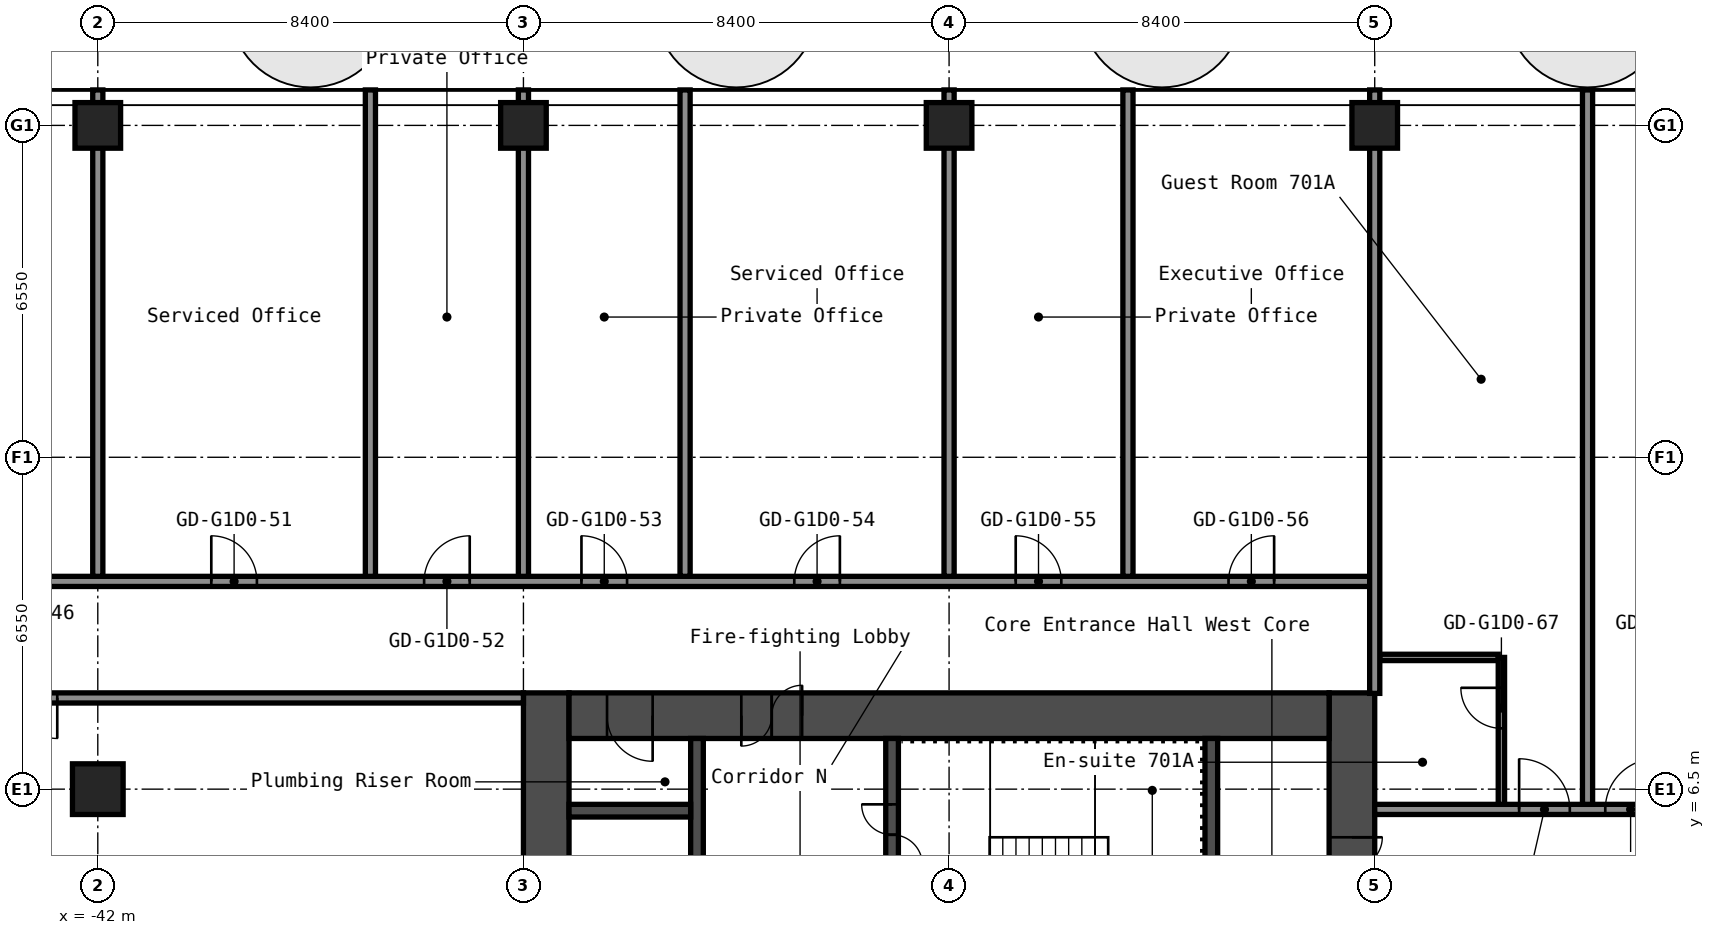
"""IFC4 building model, lengths in metres.
Left out: names, types, materials, properties, quantities, classifications, styles, units other than length and angle.
Written with IfcOpenShell. Run it as: python <this file> out.ifc"""

import sys

from ifc_helpers import new_model, si_unit, direction, frame, frame_2d, origin, origin_2d, place, context, subcontext, project, spatial, rectangle, hollow_rectangle, extrude, element, fill, save


model = new_model("IFC4")
c1 = context("Model", 3, precision=1e-05, world=origin(), true_north=direction((0.0, 1.0)))
c2 = subcontext(c1, "Body", "Model", "MODEL_VIEW")
j1 = project(units=[si_unit("LENGTHUNIT", "METRE"), si_unit("PLANEANGLEUNIT", "RADIAN")], contexts=[c1])
p1 = place(None, origin())
s1 = spatial("IfcSite", under=j1, at=p1, CompositionType="ELEMENT")
p2 = place(p1, origin())
s2 = spatial("IfcBuilding", under=s1, at=p2, CompositionType="ELEMENT")
p3 = place(p2, frame((0.0, 0.0, 29.4)))
s3 = spatial("IfcBuildingStorey", under=s2, at=p3, CompositionType="ELEMENT", Elevation=29.4)
p4 = place(p3, frame((-42.0, 6.5, 0.0), z_axis=(0.0, 0.0, 1.0), x_axis=(1.0, 0.0, 0.0)))
e1 = element("IfcColumn", 1, at=p4, inside=s3, PredefinedType="COLUMN", context=c2, shape_type="SweptSolid", body=[
    extrude(hollow_rectangle(XDim=1.0, YDim=1.0, WallThickness=0.04, at=origin_2d()), origin(), (0.0, 0.0, 1.0), 2.8),
])
for number, where, z_axis, x_axis in (
    (2, (-42.0, 19.6, 0.0), (0.0, 0.0, 1.0), (1.0, 0.0, 0.0)),
    (3, (-33.6, 19.6, 0.0), (0.0, 0.0, 1.0), (1.0, 0.0, 0.0)),
    (4, (-25.2, 19.6, 0.0), (0.0, 0.0, 1.0), (1.0, 0.0, 0.0)),
    (5, (-16.8, 19.6, 0.0), (0.0, 0.0, 1.0), (1.0, 0.0, 0.0)),
):
    element("IfcColumn", number, at=place(p3, frame(where, z_axis=z_axis, x_axis=x_axis)), inside=s3, PredefinedType="COLUMN", context=c2, shape_type="SweptSolid", body=[
        extrude(hollow_rectangle(XDim=0.9, YDim=0.9, WallThickness=0.036, at=origin_2d()), origin(), (0.0, 0.0, 1.0), 2.8),
    ])
p5 = place(p3, frame((-17.25, -8.4, 0.0), z_axis=(0.0, 0.0, 1.0), x_axis=(0.0, 1.0, 0.0)))
e6 = element("IfcWall", 6, at=p5, inside=s3, PredefinedType="SHEAR", context=c2, shape_type="SweptSolid", body=[
    extrude(rectangle(XDim=16.8, YDim=0.9, at=frame_2d((8.4, 0.0))), origin(), (0.0, 0.0, 1.0), 2.8),
])
p6 = place(p5, frame((12.75, 0.0, 0.0)))
e7 = element("IfcOpeningElement", 7, at=p6, cuts=e6, PredefinedType="OPENING", context=c2, shape_type="SweptSolid", body=[
    extrude(rectangle(XDim=1.2, YDim=2.1, at=frame_2d((0.6, 1.05))), frame((0.0, 0.46, 0.0), z_axis=(0.0, -1.0, 0.0), x_axis=(1.0, 0.0, 0.0)), (0.0, 0.0, 1.0), 0.92),
])
p7 = place(p5, frame((2.85, 0.0, 0.0)))
e8 = element("IfcOpeningElement", 8, at=p7, cuts=e6, PredefinedType="OPENING", context=c2, shape_type="SweptSolid", body=[
    extrude(rectangle(XDim=1.2, YDim=2.1, at=frame_2d((0.6, 1.05))), frame((0.0, 0.46, 0.0), z_axis=(0.0, -1.0, 0.0), x_axis=(1.0, 0.0, 0.0)), (0.0, 0.0, 1.0), 0.92),
])
p8 = place(p3, frame((-33.15, -8.4, 0.0), z_axis=(0.0, 0.0, 1.0), x_axis=(0.0, 1.0, 0.0)))
e9 = element("IfcWall", 9, at=p8, inside=s3, PredefinedType="SHEAR", context=c2, shape_type="SweptSolid", body=[
    extrude(rectangle(XDim=16.8, YDim=0.9, at=frame_2d((8.4, 0.0))), origin(), (0.0, 0.0, 1.0), 2.8),
])
p9 = place(p3, frame((-32.7, 7.95, 0.0), z_axis=(0.0, 0.0, 1.0), x_axis=(1.0, 0.0, 0.0)))
e10 = element("IfcWall", 10, at=p9, inside=s3, PredefinedType="SHEAR", context=c2, shape_type="SweptSolid", body=[
    extrude(rectangle(XDim=15.0, YDim=0.9, at=frame_2d((7.5, 0.0))), origin(), (0.0, 0.0, 1.0), 2.8),
])
p10 = place(p9, frame((3.4, 0.0, 0.0)))
e11 = element("IfcOpeningElement", 11, at=p10, cuts=e10, PredefinedType="OPENING", context=c2, shape_type="SweptSolid", body=[
    extrude(rectangle(XDim=1.2, YDim=2.1, at=frame_2d((0.6, 1.05))), frame((0.0, 0.46, 0.0), z_axis=(0.0, -1.0, 0.0), x_axis=(1.0, 0.0, 0.0)), (0.0, 0.0, 1.0), 0.92),
])
p11 = place(p9, frame((0.75, 0.0, 0.0)))
e12 = element("IfcOpeningElement", 12, at=p11, cuts=e10, PredefinedType="OPENING", context=c2, shape_type="SweptSolid", body=[
    extrude(rectangle(XDim=0.9, YDim=2.1, at=frame_2d((0.45, 1.05))), frame((0.0, 0.46, 0.0), z_axis=(0.0, -1.0, 0.0), x_axis=(1.0, 0.0, 0.0)), (0.0, 0.0, 1.0), 0.92),
])
p12 = place(p3, frame((-20.025, 1.2, 0.0), z_axis=(0.0, 0.0, 1.0), x_axis=(0.0, 1.0, 0.0)))
e13 = element("IfcWall", 13, at=p12, inside=s3, PredefinedType="SHEAR", context=c2, shape_type="SweptSolid", body=[
    extrude(rectangle(XDim=6.3, YDim=0.25, at=frame_2d((3.15, 0.0))), origin(), (0.0, 0.0, 1.0), 2.8),
])
p13 = place(p3, frame((-26.325, 3.75, 0.0), z_axis=(0.0, 0.0, 1.0), x_axis=(0.0, 1.0, 0.0)))
e14 = element("IfcWall", 14, at=p13, inside=s3, PredefinedType="SHEAR", context=c2, shape_type="SweptSolid", body=[
    extrude(rectangle(XDim=3.75, YDim=0.25, at=frame_2d((1.875, 0.0))), origin(), (0.0, 0.0, 1.0), 2.8),
])
p14 = place(p13, frame((1.25, 0.0, 0.0)))
e15 = element("IfcOpeningElement", 15, at=p14, cuts=e14, PredefinedType="OPENING", context=c2, shape_type="SweptSolid", body=[
    extrude(rectangle(XDim=1.2, YDim=2.1, at=frame_2d((0.6, 1.05))), frame((0.0, 0.135, 0.0), z_axis=(0.0, -1.0, 0.0), x_axis=(1.0, 0.0, 0.0)), (0.0, 0.0, 1.0), 0.27),
])
p15 = place(p3, frame((-30.175, 1.45, 0.0), z_axis=(0.0, 0.0, 1.0), x_axis=(0.0, 1.0, 0.0)))
e16 = element("IfcWall", 16, at=p15, inside=s3, PredefinedType="SHEAR", context=c2, shape_type="SweptSolid", body=[
    extrude(rectangle(XDim=6.05, YDim=0.25, at=frame_2d((3.025, 0.0))), origin(), (0.0, 0.0, 1.0), 2.8),
])
p16 = place(p15, frame((2.625, 0.0, 0.0)))
e17 = element("IfcOpeningElement", 17, at=p16, cuts=e16, PredefinedType="OPENING", context=c2, shape_type="SweptSolid", body=[
    extrude(rectangle(XDim=1.1, YDim=2.1, at=frame_2d((0.55, 1.05))), frame((0.0, 0.135, 0.0), z_axis=(0.0, -1.0, 0.0), x_axis=(1.0, 0.0, 0.0)), (0.0, 0.0, 1.0), 0.27),
])
p17 = place(p3, frame((-32.7, 6.075, 0.0), z_axis=(0.0, 0.0, 1.0), x_axis=(1.0, 0.0, 0.0)))
e18 = element("IfcWall", 18, at=p17, inside=s3, PredefinedType="SHEAR", context=c2, shape_type="SweptSolid", body=[
    extrude(rectangle(XDim=2.4, YDim=0.25, at=frame_2d((1.2, 0.0))), origin(), (0.0, 0.0, 1.0), 2.8),
])
p18 = place(p3, frame((-16.8, 6.1, 0.0), z_axis=(0.0, 0.0, 1.0), x_axis=(1.0, 0.0, 0.0)))
e19 = element("IfcWall", 19, at=p18, inside=s3, PredefinedType="PARTITIONING", context=c2, shape_type="SweptSolid", body=[
    extrude(rectangle(XDim=33.6, YDim=0.2, at=frame_2d((16.8, 0.0))), origin(), (0.0, 0.0, 1.0), 2.8),
])
p19 = place(p18, frame((2.85, 0.0, 0.0)))
e20 = element("IfcOpeningElement", 20, at=p19, cuts=e19, PredefinedType="OPENING", context=c2, shape_type="SweptSolid", body=[
    extrude(rectangle(XDim=1.0, YDim=2.1, at=frame_2d((0.5, 1.05))), frame((0.0, 0.11, 0.0), z_axis=(0.0, -1.0, 0.0), x_axis=(1.0, 0.0, 0.0)), (0.0, 0.0, 1.0), 0.22),
])
p20 = place(p18, frame((4.55, 0.0, 0.0)))
e21 = element("IfcOpeningElement", 21, at=p20, cuts=e19, PredefinedType="OPENING", context=c2, shape_type="SweptSolid", body=[
    extrude(rectangle(XDim=1.0, YDim=2.1, at=frame_2d((0.5, 1.05))), frame((0.0, 0.11, 0.0), z_axis=(0.0, -1.0, 0.0), x_axis=(1.0, 0.0, 0.0)), (0.0, 0.0, 1.0), 0.22),
])
p21 = place(p18, frame((13.8, 0.0, 0.0)))
e22 = element("IfcOpeningElement", 22, at=p21, cuts=e19, PredefinedType="OPENING", context=c2, shape_type="SweptSolid", body=[
    extrude(rectangle(XDim=1.0, YDim=2.1, at=frame_2d((0.5, 1.05))), frame((0.0, 0.11, 0.0), z_axis=(0.0, -1.0, 0.0), x_axis=(1.0, 0.0, 0.0)), (0.0, 0.0, 1.0), 0.22),
])
p22 = place(p18, frame((19.65, 0.0, 0.0)))
e23 = element("IfcOpeningElement", 23, at=p22, cuts=e19, PredefinedType="OPENING", context=c2, shape_type="SweptSolid", body=[
    extrude(rectangle(XDim=1.0, YDim=2.1, at=frame_2d((0.5, 1.05))), frame((0.0, 0.11, 0.0), z_axis=(0.0, -1.0, 0.0), x_axis=(1.0, 0.0, 0.0)), (0.0, 0.0, 1.0), 0.22),
])
p23 = place(p18, frame((21.35, 0.0, 0.0)))
e24 = element("IfcOpeningElement", 24, at=p23, cuts=e19, PredefinedType="OPENING", context=c2, shape_type="SweptSolid", body=[
    extrude(rectangle(XDim=1.0, YDim=2.1, at=frame_2d((0.5, 1.05))), frame((0.0, 0.11, 0.0), z_axis=(0.0, -1.0, 0.0), x_axis=(1.0, 0.0, 0.0)), (0.0, 0.0, 1.0), 0.22),
])
p24 = place(p18, frame((27.2, 0.0, 0.0)))
e25 = element("IfcOpeningElement", 25, at=p24, cuts=e19, PredefinedType="OPENING", context=c2, shape_type="SweptSolid", body=[
    extrude(rectangle(XDim=1.0, YDim=2.1, at=frame_2d((0.5, 1.05))), frame((0.0, 0.11, 0.0), z_axis=(0.0, -1.0, 0.0), x_axis=(1.0, 0.0, 0.0)), (0.0, 0.0, 1.0), 0.22),
])
p25 = place(p3, frame((-48.6, 8.3, 0.0), z_axis=(0.0, 0.0, 1.0), x_axis=(1.0, 0.0, 0.0)))
e26 = element("IfcWall", 26, at=p25, inside=s3, PredefinedType="PARTITIONING", context=c2, shape_type="SweptSolid", body=[
    extrude(rectangle(XDim=15.0, YDim=0.2, at=frame_2d((7.5, 0.0))), origin(), (0.0, 0.0, 1.0), 2.8),
])
p26 = place(p25, frame((4.2, 0.0, 0.0)))
e27 = element("IfcOpeningElement", 27, at=p26, cuts=e26, PredefinedType="OPENING", context=c2, shape_type="SweptSolid", body=[
    extrude(rectangle(XDim=1.6, YDim=2.1, at=frame_2d((0.8, 1.05))), frame((0.0, 0.11, 0.0), z_axis=(0.0, -1.0, 0.0), x_axis=(1.0, 0.0, 0.0)), (0.0, 0.0, 1.0), 0.22),
])
p27 = place(p3, frame((-16.7, 9.1, 0.0), z_axis=(0.0, 0.0, 1.0), x_axis=(1.0, 0.0, 0.0)))
e28 = element("IfcWall", 28, at=p27, inside=s3, PredefinedType="PARTITIONING", context=c2, shape_type="SweptSolid", body=[
    extrude(rectangle(XDim=2.337, YDim=0.125, at=frame_2d((1.169, 0.0))), origin(), (0.0, 0.0, 1.0), 2.8),
])
p28 = place(p3, frame((-51.1, 10.6, 0.0), z_axis=(0.0, 0.0, 1.0), x_axis=(1.0, 0.0, 0.0)))
e29 = element("IfcWall", 29, at=p28, inside=s3, PredefinedType="PARTITIONING", context=c2, shape_type="SweptSolid", body=[
    extrude(rectangle(XDim=34.3, YDim=0.2, at=frame_2d((17.15, 0.0))), origin(), (0.0, 0.0, 1.0), 2.8),
])
p29 = place(p28, frame((4.2, 0.0, 0.0)))
e30 = element("IfcOpeningElement", 30, at=p29, cuts=e29, PredefinedType="OPENING", context=c2, shape_type="SweptSolid", body=[
    extrude(rectangle(XDim=1.0, YDim=2.1, at=frame_2d((0.5, 1.05))), frame((0.0, 0.11, 0.0), z_axis=(0.0, -1.0, 0.0), x_axis=(1.0, 0.0, 0.0)), (0.0, 0.0, 1.0), 0.22),
])
p30 = place(p28, frame((11.34, 0.0, 0.0)))
e31 = element("IfcOpeningElement", 31, at=p30, cuts=e29, PredefinedType="OPENING", context=c2, shape_type="SweptSolid", body=[
    extrude(rectangle(XDim=0.9, YDim=2.1, at=frame_2d((0.45, 1.05))), frame((0.0, 0.11, 0.0), z_axis=(0.0, -1.0, 0.0), x_axis=(1.0, 0.0, 0.0)), (0.0, 0.0, 1.0), 0.22),
])
p31 = place(p28, frame((15.54, 0.0, 0.0)))
e32 = element("IfcOpeningElement", 32, at=p31, cuts=e29, PredefinedType="OPENING", context=c2, shape_type="SweptSolid", body=[
    extrude(rectangle(XDim=0.9, YDim=2.1, at=frame_2d((0.45, 1.05))), frame((0.0, 0.11, 0.0), z_axis=(0.0, -1.0, 0.0), x_axis=(1.0, 0.0, 0.0)), (0.0, 0.0, 1.0), 0.22),
])
p32 = place(p28, frame((18.645, 0.0, 0.0)))
e33 = element("IfcOpeningElement", 33, at=p32, cuts=e29, PredefinedType="OPENING", context=c2, shape_type="SweptSolid", body=[
    extrude(rectangle(XDim=0.9, YDim=2.1, at=frame_2d((0.45, 1.05))), frame((0.0, 0.11, 0.0), z_axis=(0.0, -1.0, 0.0), x_axis=(1.0, 0.0, 0.0)), (0.0, 0.0, 1.0), 0.22),
])
p33 = place(p28, frame((22.845, 0.0, 0.0)))
e34 = element("IfcOpeningElement", 34, at=p33, cuts=e29, PredefinedType="OPENING", context=c2, shape_type="SweptSolid", body=[
    extrude(rectangle(XDim=0.9, YDim=2.1, at=frame_2d((0.45, 1.05))), frame((0.0, 0.11, 0.0), z_axis=(0.0, -1.0, 0.0), x_axis=(1.0, 0.0, 0.0)), (0.0, 0.0, 1.0), 0.22),
])
p34 = place(p28, frame((27.215, 0.0, 0.0)))
e35 = element("IfcOpeningElement", 35, at=p34, cuts=e29, PredefinedType="OPENING", context=c2, shape_type="SweptSolid", body=[
    extrude(rectangle(XDim=0.9, YDim=2.1, at=frame_2d((0.45, 1.05))), frame((0.0, 0.11, 0.0), z_axis=(0.0, -1.0, 0.0), x_axis=(1.0, 0.0, 0.0)), (0.0, 0.0, 1.0), 0.22),
])
p35 = place(p28, frame((31.415, 0.0, 0.0)))
e36 = element("IfcOpeningElement", 36, at=p35, cuts=e29, PredefinedType="OPENING", context=c2, shape_type="SweptSolid", body=[
    extrude(rectangle(XDim=0.9, YDim=2.1, at=frame_2d((0.45, 1.05))), frame((0.0, 0.11, 0.0), z_axis=(0.0, -1.0, 0.0), x_axis=(1.0, 0.0, 0.0)), (0.0, 0.0, 1.0), 0.22),
])
for number, where, z_axis, x_axis in (
    (37, (-42.0, 10.7, 0.0), (0.0, 0.0, 1.0), (0.0, 1.0, 0.0)),
    (38, (-36.62, 10.7, 0.0), (0.0, 0.0, 1.0), (0.0, 1.0, 0.0)),
    (39, (-33.6, 10.7, 0.0), (0.0, 0.0, 1.0), (0.0, 1.0, 0.0)),
    (40, (-30.41, 10.7, 0.0), (0.0, 0.0, 1.0), (0.0, 1.0, 0.0)),
    (41, (-25.2, 10.7, 0.0), (0.0, 0.0, 1.0), (0.0, 1.0, 0.0)),
    (42, (-21.67, 10.7, 0.0), (0.0, 0.0, 1.0), (0.0, 1.0, 0.0)),
):
    element("IfcWall", number, at=place(p3, frame(where, z_axis=z_axis, x_axis=x_axis)), inside=s3, PredefinedType="PARTITIONING", context=c2, shape_type="SweptSolid", body=[
        extrude(rectangle(XDim=9.6, YDim=0.2, at=frame_2d((4.8, 0.0))), origin(), (0.0, 0.0, 1.0), 2.8),
    ])
p36 = place(p3, frame((-16.8, 8.39, 0.0), z_axis=(0.0, 0.0, 1.0), x_axis=(0.0, 1.0, 0.0)))
e43 = element("IfcWall", 43, at=p36, inside=s3, PredefinedType="PARTITIONING", context=c2, shape_type="SweptSolid", body=[
    extrude(rectangle(XDim=11.91, YDim=0.2, at=frame_2d((5.955, 0.0))), origin(), (0.0, 0.0, 1.0), 2.8),
])
p37 = place(p3, frame((-14.3, 6.2, 0.0), z_axis=(0.0, 0.0, 1.0), x_axis=(0.0, 1.0, 0.0)))
e44 = element("IfcWall", 44, at=p37, inside=s3, PredefinedType="PARTITIONING", context=c2, shape_type="SweptSolid", body=[
    extrude(rectangle(XDim=2.9, YDim=0.125, at=frame_2d((1.45, 0.0))), origin(), (0.0, 0.0, 1.0), 2.8),
])
p38 = place(p37, frame((1.5, 0.0, 0.0)))
e45 = element("IfcOpeningElement", 45, at=p38, cuts=e44, PredefinedType="OPENING", context=c2, shape_type="SweptSolid", body=[
    extrude(rectangle(XDim=0.8, YDim=2.1, at=frame_2d((0.4, 1.05))), frame((0.0, 0.073, 0.0), z_axis=(0.0, -1.0, 0.0), x_axis=(1.0, 0.0, 0.0)), (0.0, 0.0, 1.0), 0.145),
])
p39 = place(p3, frame((-12.6, 6.2, 0.0), z_axis=(0.0, 0.0, 1.0), x_axis=(0.0, 1.0, 0.0)))
e46 = element("IfcWall", 46, at=p39, inside=s3, PredefinedType="PARTITIONING", context=c2, shape_type="SweptSolid", body=[
    extrude(rectangle(XDim=14.1, YDim=0.2, at=frame_2d((7.05, 0.0))), origin(), (0.0, 0.0, 1.0), 2.8),
])
p40 = place(p6, origin())
e47 = element("IfcDoor", 47, at=p40, inside=s3, OperationType="DOUBLE_DOOR_SINGLE_SWING", PredefinedType="DOOR", context=c2, shape_type="SweptSolid", body=[
    extrude(rectangle(XDim=1.2, YDim=2.1, at=frame_2d((0.6, 1.05))), frame((0.0, 0.025, 0.0), z_axis=(0.0, -1.0, 0.0), x_axis=(1.0, 0.0, 0.0)), (0.0, 0.0, 1.0), 0.05),
])
fill(e7, e47)
p41 = place(p10, origin())
e48 = element("IfcDoor", 48, at=p41, inside=s3, OperationType="DOUBLE_DOOR_SINGLE_SWING", PredefinedType="DOOR", context=c2, shape_type="SweptSolid", body=[
    extrude(rectangle(XDim=1.2, YDim=2.1, at=frame_2d((0.6, 1.05))), frame((0.0, 0.025, 0.0), z_axis=(0.0, -1.0, 0.0), x_axis=(1.0, 0.0, 0.0)), (0.0, 0.0, 1.0), 0.05),
])
fill(e11, e48)
p42 = place(p11, origin())
e49 = element("IfcDoor", 49, at=p42, inside=s3, OperationType="SINGLE_SWING_RIGHT", PredefinedType="DOOR", context=c2, shape_type="SweptSolid", body=[
    extrude(rectangle(XDim=0.9, YDim=2.1, at=frame_2d((0.45, 1.05))), frame((0.0, 0.025, 0.0), z_axis=(0.0, -1.0, 0.0), x_axis=(1.0, 0.0, 0.0)), (0.0, 0.0, 1.0), 0.05),
])
fill(e12, e49)
p43 = place(p14, origin())
e50 = element("IfcDoor", 50, at=p43, inside=s3, OperationType="DOUBLE_DOOR_SINGLE_SWING", PredefinedType="DOOR", context=c2, shape_type="SweptSolid", body=[
    extrude(rectangle(XDim=1.2, YDim=2.1, at=frame_2d((0.6, 1.05))), frame((0.0, 0.025, 0.0), z_axis=(0.0, -1.0, 0.0), x_axis=(1.0, 0.0, 0.0)), (0.0, 0.0, 1.0), 0.05),
])
fill(e15, e50)
p44 = place(p19, origin())
e51 = element("IfcDoor", 51, at=p44, inside=s3, OperationType="SINGLE_SWING_RIGHT", PredefinedType="DOOR", context=c2, shape_type="SweptSolid", body=[
    extrude(rectangle(XDim=1.0, YDim=2.1, at=frame_2d((0.5, 1.05))), frame((0.0, 0.025, 0.0), z_axis=(0.0, -1.0, 0.0), x_axis=(1.0, 0.0, 0.0)), (0.0, 0.0, 1.0), 0.05),
])
fill(e20, e51)
p45 = place(p20, origin())
e52 = element("IfcDoor", 52, at=p45, inside=s3, OperationType="SINGLE_SWING_LEFT", PredefinedType="DOOR", context=c2, shape_type="SweptSolid", body=[
    extrude(rectangle(XDim=1.0, YDim=2.1, at=frame_2d((0.5, 1.05))), frame((0.0, 0.025, 0.0), z_axis=(0.0, -1.0, 0.0), x_axis=(1.0, 0.0, 0.0)), (0.0, 0.0, 1.0), 0.05),
])
fill(e21, e52)
p46 = place(p26, origin())
e53 = element("IfcDoor", 53, at=p46, inside=s3, OperationType="DOUBLE_DOOR_SINGLE_SWING", PredefinedType="DOOR", context=c2, shape_type="SweptSolid", body=[
    extrude(rectangle(XDim=1.6, YDim=2.1, at=frame_2d((0.8, 1.05))), frame((0.0, 0.025, 0.0), z_axis=(0.0, -1.0, 0.0), x_axis=(1.0, 0.0, 0.0)), (0.0, 0.0, 1.0), 0.05),
])
fill(e27, e53)
p47 = place(p30, origin())
e54 = element("IfcDoor", 54, at=p47, inside=s3, OperationType="SINGLE_SWING_RIGHT", PredefinedType="DOOR", context=c2, shape_type="SweptSolid", body=[
    extrude(rectangle(XDim=0.9, YDim=2.1, at=frame_2d((0.45, 1.05))), frame((0.0, 0.025, 0.0), z_axis=(0.0, -1.0, 0.0), x_axis=(1.0, 0.0, 0.0)), (0.0, 0.0, 1.0), 0.05),
])
fill(e31, e54)
p48 = place(p31, origin())
e55 = element("IfcDoor", 55, at=p48, inside=s3, OperationType="SINGLE_SWING_LEFT", PredefinedType="DOOR", context=c2, shape_type="SweptSolid", body=[
    extrude(rectangle(XDim=0.9, YDim=2.1, at=frame_2d((0.45, 1.05))), frame((0.0, 0.025, 0.0), z_axis=(0.0, -1.0, 0.0), x_axis=(1.0, 0.0, 0.0)), (0.0, 0.0, 1.0), 0.05),
])
fill(e32, e55)
p49 = place(p32, origin())
e56 = element("IfcDoor", 56, at=p49, inside=s3, OperationType="SINGLE_SWING_RIGHT", PredefinedType="DOOR", context=c2, shape_type="SweptSolid", body=[
    extrude(rectangle(XDim=0.9, YDim=2.1, at=frame_2d((0.45, 1.05))), frame((0.0, 0.025, 0.0), z_axis=(0.0, -1.0, 0.0), x_axis=(1.0, 0.0, 0.0)), (0.0, 0.0, 1.0), 0.05),
])
fill(e33, e56)
p50 = place(p33, origin())
e57 = element("IfcDoor", 57, at=p50, inside=s3, OperationType="SINGLE_SWING_LEFT", PredefinedType="DOOR", context=c2, shape_type="SweptSolid", body=[
    extrude(rectangle(XDim=0.9, YDim=2.1, at=frame_2d((0.45, 1.05))), frame((0.0, 0.025, 0.0), z_axis=(0.0, -1.0, 0.0), x_axis=(1.0, 0.0, 0.0)), (0.0, 0.0, 1.0), 0.05),
])
fill(e34, e57)
p51 = place(p34, origin())
e58 = element("IfcDoor", 58, at=p51, inside=s3, OperationType="SINGLE_SWING_RIGHT", PredefinedType="DOOR", context=c2, shape_type="SweptSolid", body=[
    extrude(rectangle(XDim=0.9, YDim=2.1, at=frame_2d((0.45, 1.05))), frame((0.0, 0.025, 0.0), z_axis=(0.0, -1.0, 0.0), x_axis=(1.0, 0.0, 0.0)), (0.0, 0.0, 1.0), 0.05),
])
fill(e35, e58)
p52 = place(p35, origin())
e59 = element("IfcDoor", 59, at=p52, inside=s3, OperationType="SINGLE_SWING_LEFT", PredefinedType="DOOR", context=c2, shape_type="SweptSolid", body=[
    extrude(rectangle(XDim=0.9, YDim=2.1, at=frame_2d((0.45, 1.05))), frame((0.0, 0.025, 0.0), z_axis=(0.0, -1.0, 0.0), x_axis=(1.0, 0.0, 0.0)), (0.0, 0.0, 1.0), 0.05),
])
fill(e36, e59)
p53 = place(p38, origin())
e60 = element("IfcDoor", 60, at=p53, inside=s3, OperationType="SINGLE_SWING_LEFT", PredefinedType="DOOR", context=c2, shape_type="SweptSolid", body=[
    extrude(rectangle(XDim=0.8, YDim=2.1, at=frame_2d((0.4, 1.05))), frame((0.0, 0.025, 0.0), z_axis=(0.0, -1.0, 0.0), x_axis=(1.0, 0.0, 0.0)), (0.0, 0.0, 1.0), 0.05),
])
fill(e45, e60)
save(model, sys.argv[1])
